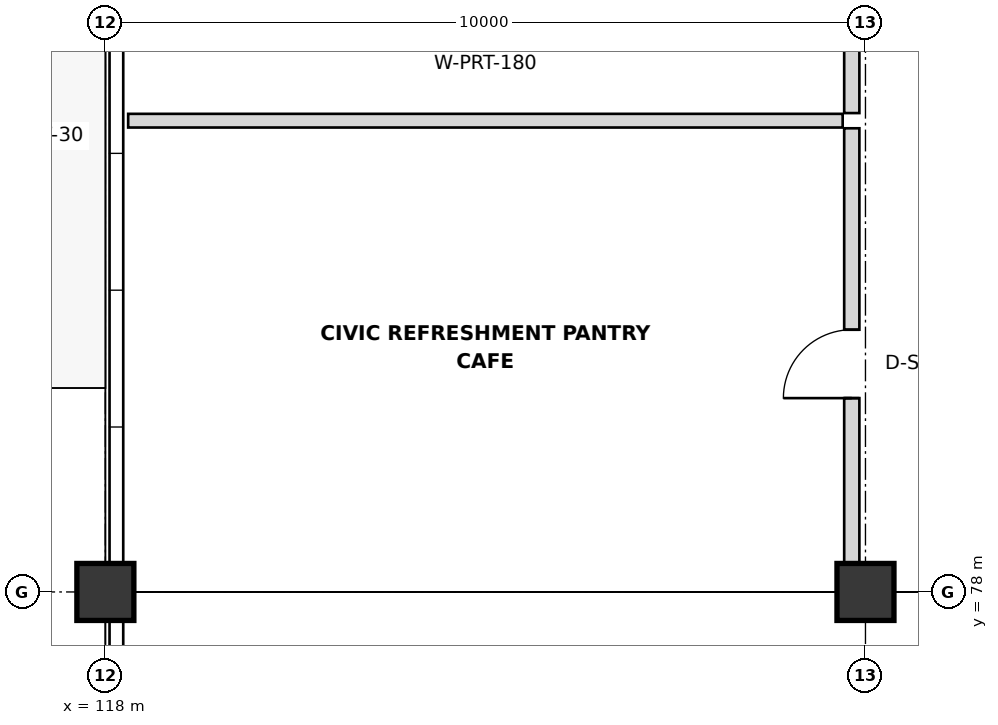
"""IFC4 building model, lengths in metres.
Left out: names, types, materials, properties, quantities, classifications, styles, units other than length and angle.
Written with IfcOpenShell. Run it as: python <this file> out.ifc"""

import sys

from ifc_helpers import new_model, si_unit, direction, frame, frame_2d, origin, origin_2d, place, context, subcontext, project, spatial, rectangle, extrude, element, fill, save


model = new_model("IFC4")
c1 = context("Model", 3, precision=1e-05, world=origin(), true_north=direction((0.0, 1.0)))
c2 = subcontext(c1, "Body", "Model", "MODEL_VIEW")
j1 = project(units=[si_unit("LENGTHUNIT", "METRE"), si_unit("PLANEANGLEUNIT", "RADIAN")], contexts=[c1])
p1 = place(None, origin())
s1 = spatial("IfcSite", under=j1, at=p1, CompositionType="ELEMENT")
p2 = place(p1, origin())
s2 = spatial("IfcBuilding", under=s1, at=p2, CompositionType="ELEMENT")
p3 = place(p2, frame((0.0, 0.0, 14.4)))
s3 = spatial("IfcBuildingStorey", under=s2, at=p3, CompositionType="ELEMENT", Elevation=14.4)
for number, where, z_axis, x_axis in (
    (1, (118.0, 78.0, 0.0), (0.0, 0.0, 1.0), (1.0, 0.0, 0.0)),
    (2, (128.0, 78.0, 0.0), (0.0, 0.0, 1.0), (1.0, 0.0, 0.0)),
):
    element("IfcColumn", number, at=place(p3, frame(where, z_axis=z_axis, x_axis=x_axis)), inside=s3, PredefinedType="COLUMN", context=c2, shape_type="SweptSolid", body=[
        extrude(rectangle(XDim=0.75, YDim=0.75, at=origin_2d()), origin(), (0.0, 0.0, 1.0), 4.2),
    ])
p4 = place(p3, frame((127.82, 84.3, 0.0), z_axis=(0.0, 0.0, 1.0), x_axis=(0.0, 1.0, 0.0)))
e3 = element("IfcWall", 3, at=p4, inside=s3, PredefinedType="PARTITIONING", context=c2, shape_type="SweptSolid", body=[
    extrude(rectangle(XDim=29.4, YDim=0.2, at=frame_2d((14.7, 0.0))), origin(), (0.0, 0.0, 1.0), 3.078),
])
p5 = place(p4, frame((11.125, 0.0, 0.0)))
e4 = element("IfcOpeningElement", 4, at=p5, cuts=e3, PredefinedType="OPENING", context=c2, shape_type="SweptSolid", body=[
    extrude(rectangle(XDim=1.15, YDim=2.3, at=frame_2d((0.575, 1.15))), frame((0.0, 0.11, 0.0), z_axis=(0.0, -1.0, 0.0), x_axis=(1.0, 0.0, 0.0)), (0.0, 0.0, 1.0), 0.22),
])
p6 = place(p3, frame((127.82, 78.3, 0.0), z_axis=(0.0, 0.0, 1.0), x_axis=(0.0, 1.0, 0.0)))
e5 = element("IfcWall", 5, at=p6, inside=s3, PredefinedType="PARTITIONING", context=c2, shape_type="SweptSolid", body=[
    extrude(rectangle(XDim=5.8, YDim=0.2, at=frame_2d((2.9, 0.0))), origin(), (0.0, 0.0, 1.0), 3.078),
])
p7 = place(p6, frame((2.25, 0.0, 0.0)))
e6 = element("IfcOpeningElement", 6, at=p7, cuts=e5, PredefinedType="OPENING", context=c2, shape_type="SweptSolid", body=[
    extrude(rectangle(XDim=0.9, YDim=2.1, at=frame_2d((0.45, 1.05))), frame((0.0, 0.11, 0.0), z_axis=(0.0, -1.0, 0.0), x_axis=(1.0, 0.0, 0.0)), (0.0, 0.0, 1.0), 0.22),
])
p8 = place(p3, frame((118.3, 84.2, 0.0), z_axis=(0.0, 0.0, 1.0), x_axis=(1.0, 0.0, 0.0)))
e7 = element("IfcWall", 7, at=p8, inside=s3, PredefinedType="PARTITIONING", context=c2, shape_type="SweptSolid", body=[
    extrude(rectangle(XDim=9.4, YDim=0.18, at=frame_2d((4.7, 0.0))), origin(), (0.0, 0.0, 1.0), 3.178),
])
p9 = place(p7, origin())
e8 = element("IfcDoor", 8, at=p9, inside=s3, OperationType="SINGLE_SWING_LEFT", PredefinedType="DOOR", context=c2, shape_type="SweptSolid", body=[
    extrude(rectangle(XDim=0.9, YDim=2.1, at=frame_2d((0.45, 1.05))), frame((0.0, 0.025, 0.0), z_axis=(0.0, -1.0, 0.0), x_axis=(1.0, 0.0, 0.0)), (0.0, 0.0, 1.0), 0.05),
])
fill(e6, e8)
save(model, sys.argv[1])
